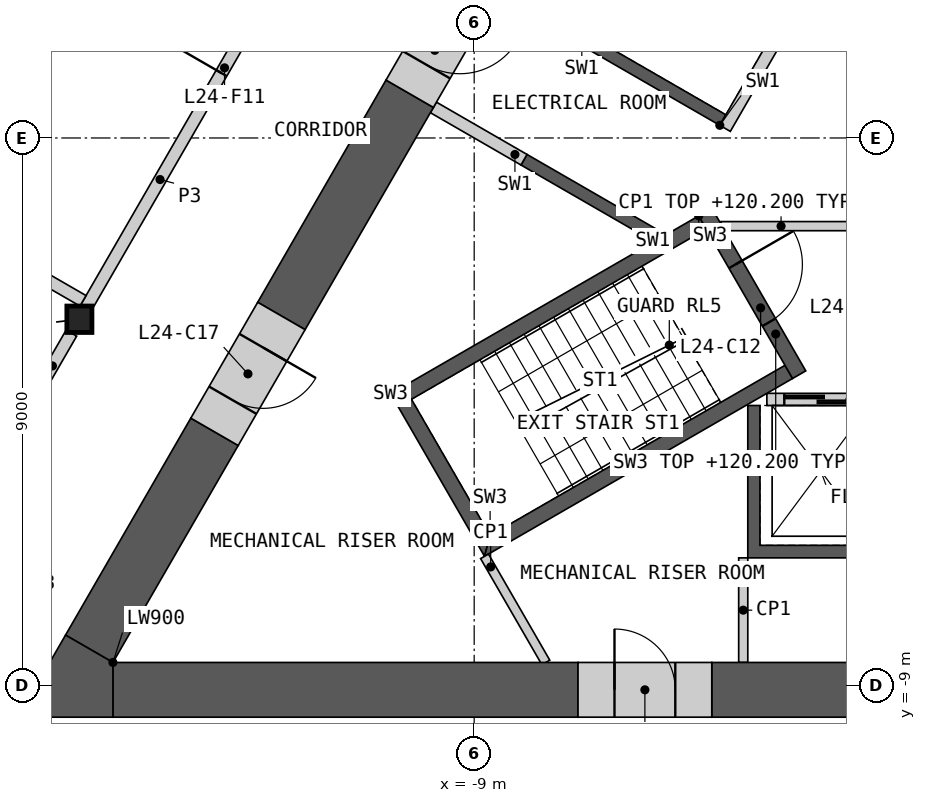
"""IFC4 building model, lengths in metres.
Left out: names, types, materials, properties, quantities, classifications, styles, units other than length and angle.
Written with IfcOpenShell. Run it as: python <this file> out.ifc"""

import sys

from ifc_helpers import new_model, si_unit, direction, frame, frame_2d, origin, origin_2d, place, context, subcontext, project, spatial, polyline, rectangle, i_section, outline, extrude, element, fill, save


model = new_model("IFC4")
c1 = context("Model", 3, precision=1e-05, world=origin(), true_north=direction((0.0, 1.0)))
c2 = subcontext(c1, "Body", "Model", "MODEL_VIEW")
j1 = project(units=[si_unit("LENGTHUNIT", "METRE"), si_unit("PLANEANGLEUNIT", "RADIAN")], contexts=[c1])
p1 = place(None, origin())
s1 = spatial("IfcSite", under=j1, at=p1, CompositionType="ELEMENT")
p2 = place(p1, origin())
s2 = spatial("IfcBuilding", under=s1, at=p2, CompositionType="ELEMENT")
p3 = place(p2, frame((0.0, 0.0, 116.4)))
s3 = spatial("IfcBuildingStorey", under=s2, at=p3, CompositionType="ELEMENT", Elevation=116.4)
p4 = place(p3, frame((-15.493, -2.982, 0.0), z_axis=(0.0, 0.0, 1.0), x_axis=(1.0, 0.0, 0.0)))
e1 = element("IfcColumn", 1, at=p4, inside=s3, PredefinedType="COLUMN", context=c2, shape_type="SweptSolid", body=[
    extrude(i_section(OverallWidth=0.412, OverallDepth=0.435, WebThickness=0.036, FlangeThickness=0.057, at=origin_2d()), origin(), (0.0, 0.0, 1.0), 4.2),
])
p5 = place(p3, origin())
e2 = element("IfcWall", 2, at=p5, inside=s3, PredefinedType="SHEAR", context=c2, shape_type="SweptSolid", body=[
    extrude(outline(polyline([(4.5, -4.4), (4.5, -6.906), (-4.5, -6.906), (-4.5, -4.4), (-4.3, -4.4), (-4.3, -6.7), (-2.3, -6.7), (-2.3, -4.4), (-2.1, -4.4), (-2.1, -6.7), (-0.1, -6.7), (-0.1, -4.4), (0.1, -4.4), (0.1, -6.7), (2.1, -6.7), (2.1, -4.4), (2.3, -4.4), (2.3, -6.7), (4.3, -6.7), (4.3, -4.4), (4.5, -4.4)])), origin(), (0.0, 0.0, 1.0), 3.8),
])
p6 = place(p3, frame((-4.187, -4.3, 0.0), z_axis=(0.0, 0.0, 1.0), x_axis=(1.0, 0.0, 0.0)))
e3 = element("IfcWall", 3, at=p6, inside=s3, PredefinedType="SOLIDWALL", context=c2, shape_type="SweptSolid", body=[
    extrude(rectangle(XDim=8.373, YDim=0.2, at=frame_2d((4.187, 0.0))), origin(), (0.0, 0.0, 1.0), 3.8),
])
p7 = place(p6, frame((0.287, 0.0, 0.0)))
e4 = element("IfcOpeningElement", 4, at=p7, cuts=e3, PredefinedType="OPENING", context=c2, shape_type="SweptSolid", body=[
    extrude(rectangle(XDim=1.2, YDim=2.1, at=frame_2d((0.6, 1.05))), frame((0.0, 0.11, 0.0), z_axis=(0.0, -1.0, 0.0), x_axis=(1.0, 0.0, 0.0)), (0.0, 0.0, 1.0), 0.22),
])
p8 = place(p6, frame((2.387, 0.0, 0.0)))
e5 = element("IfcOpeningElement", 5, at=p8, cuts=e3, PredefinedType="OPENING", context=c2, shape_type="SweptSolid", body=[
    extrude(rectangle(XDim=1.4, YDim=2.1, at=frame_2d((0.7, 1.05))), frame((0.0, 0.11, 0.0), z_axis=(0.0, -1.0, 0.0), x_axis=(1.0, 0.0, 0.0)), (0.0, 0.0, 1.0), 0.22),
])
p9 = place(p6, frame((4.737, 0.0, 0.0)))
e6 = element("IfcOpeningElement", 6, at=p9, cuts=e3, PredefinedType="OPENING", context=c2, shape_type="SweptSolid", body=[
    extrude(rectangle(XDim=1.1, YDim=2.1, at=frame_2d((0.55, 1.05))), frame((0.0, 0.11, 0.0), z_axis=(0.0, -1.0, 0.0), x_axis=(1.0, 0.0, 0.0)), (0.0, 0.0, 1.0), 0.22),
])
p10 = place(p6, frame((6.887, 0.0, 0.0)))
e7 = element("IfcOpeningElement", 7, at=p10, cuts=e3, PredefinedType="OPENING", context=c2, shape_type="SweptSolid", body=[
    extrude(rectangle(XDim=1.2, YDim=2.1, at=frame_2d((0.6, 1.05))), frame((0.0, 0.11, 0.0), z_axis=(0.0, -1.0, 0.0), x_axis=(1.0, 0.0, 0.0)), (0.0, 0.0, 1.0), 0.22),
])
p11 = place(p3, origin())
e8 = element("IfcWall", 8, at=p11, inside=s3, PredefinedType="SHEAR", context=c2, shape_type="SweptSolid", body=[
    extrude(outline(polyline([(-6.061, -1.697), (-8.231, -0.444), (-8.131, -0.271), (-5.96, -1.524), (-6.061, -1.697)])), origin(), (0.0, 0.0, 1.0), 3.8),
])
p12 = place(p3, origin())
e9 = element("IfcWall", 9, at=p12, inside=s3, PredefinedType="SHEAR", context=c2, shape_type="SweptSolid", body=[
    extrude(outline(polyline([(-4.96, 0.208), (-7.131, 1.461), (-5.931, 3.54), (-3.76, 2.287), (-3.861, 2.113), (-5.852, 3.263), (-6.852, 1.531), (-4.861, 0.381), (-4.96, 0.208)])), origin(), (0.0, 0.0, 1.0), 3.8),
])
p13 = place(p3, frame((-1.631, 5.776, 0.0), z_axis=(0.0, 0.0, 1.0), x_axis=(-0.499992876559, -0.866029516466, 0.0)))
e10 = element("IfcWall", 10, at=p13, inside=s3, PredefinedType="SOLIDWALL", context=c2, shape_type="SweptSolid", body=[
    extrude(rectangle(XDim=6.486, YDim=0.2, at=frame_2d((3.243, 0.0))), origin(), (0.0, 0.0, 1.0), 3.8),
])
p14 = place(p13, frame((0.437, 0.0, 0.0)))
e11 = element("IfcOpeningElement", 11, at=p14, cuts=e10, PredefinedType="OPENING", context=c2, shape_type="SweptSolid", body=[
    extrude(rectangle(XDim=0.9, YDim=2.1, at=frame_2d((0.45, 1.05))), frame((0.0, 0.11, 0.0), z_axis=(0.0, -1.0, 0.0), x_axis=(1.0, 0.0, 0.0)), (0.0, 0.0, 1.0), 0.22),
])
p15 = place(p13, frame((2.637, 0.0, 0.0)))
e12 = element("IfcOpeningElement", 12, at=p15, cuts=e10, PredefinedType="OPENING", context=c2, shape_type="SweptSolid", body=[
    extrude(rectangle(XDim=0.9, YDim=2.1, at=frame_2d((0.45, 1.05))), frame((0.0, 0.11, 0.0), z_axis=(0.0, -1.0, 0.0), x_axis=(1.0, 0.0, 0.0)), (0.0, 0.0, 1.0), 0.22),
])
p16 = place(p3, frame((-8.181, -0.357, 0.0), z_axis=(0.0, 0.0, 1.0), x_axis=(-0.866024871741, 0.500000921525, 0.0)))
e13 = element("IfcWall", 13, at=p16, inside=s3, PredefinedType="SHEAR", context=c2, shape_type="SweptSolid", body=[
    extrude(rectangle(XDim=1.72, YDim=0.2, at=frame_2d((0.86, 0.0))), origin(), (0.0, 0.0, 1.0), 3.8),
])
p17 = place(p3, frame((-4.941, -1.45, 0.0), z_axis=(0.0, 0.0, 1.0), x_axis=(1.0, 0.0, 0.0)))
e14 = element("IfcWall", 14, at=p17, inside=s3, PredefinedType="PARTITIONING", context=c2, shape_type="SweptSolid", body=[
    extrude(rectangle(XDim=9.882, YDim=0.15, at=frame_2d((4.941, 0.0))), origin(), (0.0, 0.0, 1.0), 3.8),
])
p18 = place(p17, frame((4.391, 0.0, 0.0)))
e15 = element("IfcOpeningElement", 15, at=p18, cuts=e14, PredefinedType="OPENING", context=c2, shape_type="SweptSolid", body=[
    extrude(rectangle(XDim=1.1, YDim=2.1, at=frame_2d((0.55, 1.05))), frame((0.0, 0.085, 0.0), z_axis=(0.0, -1.0, 0.0), x_axis=(1.0, 0.0, 0.0)), (0.0, 0.0, 1.0), 0.17),
])
p19 = place(p3, origin())
e16 = element("IfcWall", 16, at=p19, inside=s3, PredefinedType="SHEAR", context=c2, shape_type="SweptSolid", body=[
    extrude(outline(polyline([(-5.307, -1.281), (-10.374, -4.206), (-10.032, -4.298), (-5.182, -1.498), (-5.307, -1.281)])), origin(), (0.0, 0.0, 1.0), 3.8),
])
p20 = place(p3, origin())
e17 = element("IfcWall", 17, at=p20, inside=s3, PredefinedType="SHEAR", context=c2, shape_type="SweptSolid", body=[
    extrude(outline(polyline([(-10.374, -4.206), (-8.83, -6.881), (-8.738, -6.539), (-10.032, -4.298), (-10.374, -4.206)])), origin(), (0.0, 0.0, 1.0), 3.8),
])
p21 = place(p3, origin())
e18 = element("IfcWall", 18, at=p21, inside=s3, PredefinedType="SHEAR", context=c2, shape_type="SweptSolid", body=[
    extrude(outline(polyline([(-8.738, -6.539), (-8.83, -6.881), (-3.763, -3.956), (-3.888, -3.739), (-8.738, -6.539)])), origin(), (0.0, 0.0, 1.0), 3.8),
])
p22 = place(p3, frame((-5.199, -1.219, 0.0), z_axis=(0.0, 0.0, 1.0), x_axis=(0.499982516597, -0.866035497597, 0.0)))
e19 = element("IfcWall", 19, at=p22, inside=s3, PredefinedType="SHEAR", context=c2, shape_type="SweptSolid", body=[
    extrude(rectangle(XDim=3.088, YDim=0.25, at=frame_2d((1.544, 0.0))), origin(), (0.0, 0.0, 1.0), 3.8),
])
p23 = place(p22, frame((0.994, 0.0, 0.0)))
e20 = element("IfcOpeningElement", 20, at=p23, cuts=e19, PredefinedType="OPENING", context=c2, shape_type="SweptSolid", body=[
    extrude(rectangle(XDim=1.1, YDim=2.1, at=frame_2d((0.55, 1.05))), frame((0.0, 0.135, 0.0), z_axis=(0.0, -1.0, 0.0), x_axis=(1.0, 0.0, 0.0)), (0.0, 0.0, 1.0), 0.27),
])
p24 = place(p3, frame((-4.575, -6.906, 0.0), z_axis=(0.0, 0.0, 1.0), x_axis=(0.0, -1.0, 0.0)))
e21 = element("IfcWall", 21, at=p24, inside=s3, PredefinedType="PARTITIONING", context=c2, shape_type="SweptSolid", body=[
    extrude(rectangle(XDim=1.72, YDim=0.15, at=frame_2d((0.86, 0.0))), origin(), (0.0, 0.0, 1.0), 3.8),
])
p25 = place(p3, frame((-8.83, -6.881, 0.0), z_axis=(0.0, 0.0, 1.0), x_axis=(0.500085890408, -0.865975809255, 0.0)))
e22 = element("IfcWall", 22, at=p25, inside=s3, PredefinedType="PARTITIONING", context=c2, shape_type="SweptSolid", body=[
    extrude(rectangle(XDim=2.016, YDim=0.15, at=frame_2d((1.008, 0.0))), origin(), (0.0, 0.0, 1.0), 3.8),
])
p26 = place(p3, frame((-14.941, -9.076, 0.0), z_axis=(0.0, 0.0, 1.0), x_axis=(1.0, 0.0, 0.0)))
e23 = element("IfcWall", 23, at=p26, inside=s3, PredefinedType="SHEAR", context=c2, shape_type="SweptSolid", body=[
    extrude(rectangle(XDim=7.649, YDim=0.9, at=frame_2d((3.824, 0.0))), origin(), (0.0, 0.0, 1.0), 3.8),
])
p27 = place(p3, frame((-5.093, -9.076, 0.0), z_axis=(0.0, 0.0, 1.0), x_axis=(1.0, 0.0, 0.0)))
e24 = element("IfcWall", 24, at=p27, inside=s3, PredefinedType="SHEAR", context=c2, shape_type="SweptSolid", body=[
    extrude(rectangle(XDim=3.992, YDim=0.9, at=frame_2d((1.996, 0.0))), origin(), (0.0, 0.0, 1.0), 3.8),
])
p28 = place(p3, frame((-10.06, 0.728, 0.0), z_axis=(0.0, 0.0, 1.0), x_axis=(-0.500021220092, -0.866013152012, 0.0)))
e25 = element("IfcWall", 25, at=p28, inside=s3, PredefinedType="SHEAR", context=c2, shape_type="SweptSolid", body=[
    extrude(rectangle(XDim=4.22, YDim=0.9, at=frame_2d((2.11, 0.0))), origin(), (0.0, 0.0, 1.0), 3.8),
])
p29 = place(p3, frame((-13.271, -4.833, 0.0), z_axis=(0.0, 0.0, 1.0), x_axis=(-0.499994272862, -0.866028710324, 0.0)))
e26 = element("IfcWall", 26, at=p29, inside=s3, PredefinedType="SHEAR", context=c2, shape_type="SweptSolid", body=[
    extrude(rectangle(XDim=4.121, YDim=0.9, at=frame_2d((2.06, 0.0))), origin(), (0.0, 0.0, 1.0), 3.8),
])
p30 = place(p3, origin())
e27 = element("IfcWall", 27, at=p30, inside=s3, PredefinedType="SHEAR", context=c2, shape_type="SweptSolid", body=[
    extrude(outline(polyline([(-14.941, -8.626), (-14.941, -9.526), (-16.5, -9.526), (-15.721, -8.176), (-14.941, -8.626)])), origin(), (0.0, 0.0, 1.0), 3.8),
])
p31 = place(p3, frame((-12.171, -2.927, 0.0), z_axis=(0.0, 0.0, 1.0), x_axis=(-0.499946605688, -0.86605622881, 0.0)))
e28 = element("IfcWall", 28, at=p31, inside=s3, PredefinedType="SHEAR", context=c2, shape_type="SweptSolid", body=[
    extrude(rectangle(XDim=2.2, YDim=0.9, at=frame_2d((1.1, 0.0))), origin(), (0.0, 0.0, 1.0), 3.8),
])
p32 = place(p31, frame((0.6, 0.0, 0.0)))
e29 = element("IfcOpeningElement", 29, at=p32, cuts=e28, PredefinedType="OPENING", context=c2, shape_type="SweptSolid", body=[
    extrude(rectangle(XDim=1.0, YDim=2.1, at=frame_2d((0.5, 1.05))), frame((0.0, 0.46, 0.0), z_axis=(0.0, -1.0, 0.0), x_axis=(1.0, 0.0, 0.0)), (0.0, 0.0, 1.0), 0.92),
])
p33 = place(p3, frame((-7.292, -9.076, 0.0), z_axis=(0.0, 0.0, 1.0), x_axis=(1.0, 0.0, 0.0)))
e30 = element("IfcWall", 30, at=p33, inside=s3, PredefinedType="SHEAR", context=c2, shape_type="SweptSolid", body=[
    extrude(rectangle(XDim=2.2, YDim=0.9, at=frame_2d((1.1, 0.0))), origin(), (0.0, 0.0, 1.0), 3.8),
])
p34 = place(p33, frame((0.6, 0.0, 0.0)))
e31 = element("IfcOpeningElement", 31, at=p34, cuts=e30, PredefinedType="OPENING", context=c2, shape_type="SweptSolid", body=[
    extrude(rectangle(XDim=1.0, YDim=2.1, at=frame_2d((0.5, 1.05))), frame((0.0, 0.46, 0.0), z_axis=(0.0, -1.0, 0.0), x_axis=(1.0, 0.0, 0.0)), (0.0, 0.0, 1.0), 0.92),
])
p35 = place(p3, frame((-8.96, 2.633, 0.0), z_axis=(0.0, 0.0, 1.0), x_axis=(-0.50002983664, -0.866008176907, 0.0)))
e32 = element("IfcWall", 32, at=p35, inside=s3, PredefinedType="SHEAR", context=c2, shape_type="SweptSolid", body=[
    extrude(rectangle(XDim=2.2, YDim=0.9, at=frame_2d((1.1, 0.0))), origin(), (0.0, 0.0, 1.0), 3.8),
])
p36 = place(p35, frame((0.55, 0.0, 0.0)))
e33 = element("IfcOpeningElement", 33, at=p36, cuts=e32, PredefinedType="OPENING", context=c2, shape_type="SweptSolid", body=[
    extrude(rectangle(XDim=1.1, YDim=2.1, at=frame_2d((0.55, 1.05))), frame((0.0, 0.46, 0.0), z_axis=(0.0, -1.0, 0.0), x_axis=(1.0, 0.0, 0.0)), (0.0, 0.0, 1.0), 0.92),
])
p37 = place(p3, frame((-15.402, -2.823, 0.0), z_axis=(0.0, 0.0, 1.0), x_axis=(0.500023237168, 0.866011987384, 0.0)))
e34 = element("IfcWall", 34, at=p37, inside=s3, PredefinedType="PARTITIONING", context=c2, shape_type="SweptSolid", body=[
    extrude(rectangle(XDim=9.883, YDim=0.2, at=frame_2d((4.942, 0.0))), origin(), (0.0, 0.0, 1.0), 3.8),
])
p38 = place(p37, frame((4.492, 0.0, 0.0)))
e35 = element("IfcOpeningElement", 35, at=p38, cuts=e34, PredefinedType="OPENING", context=c2, shape_type="SweptSolid", body=[
    extrude(rectangle(XDim=1.0, YDim=2.1, at=frame_2d((0.5, 1.05))), frame((0.0, 0.11, 0.0), z_axis=(0.0, -1.0, 0.0), x_axis=(1.0, 0.0, 0.0)), (0.0, 0.0, 1.0), 0.22),
])
p39 = place(p3, frame((-18.744, -8.613, 0.0), z_axis=(0.0, 0.0, 1.0), x_axis=(0.499997920671, 0.866026604282, 0.0)))
e36 = element("IfcWall", 36, at=p39, inside=s3, PredefinedType="PARTITIONING", context=c2, shape_type="SweptSolid", body=[
    extrude(rectangle(XDim=6.24, YDim=0.2, at=frame_2d((3.12, 0.0))), origin(), (0.0, 0.0, 1.0), 3.8),
])
p40 = place(p39, frame((2.67, 0.0, 0.0)))
e37 = element("IfcOpeningElement", 37, at=p40, cuts=e36, PredefinedType="OPENING", context=c2, shape_type="SweptSolid", body=[
    extrude(rectangle(XDim=1.0, YDim=2.1, at=frame_2d((0.5, 1.05))), frame((0.0, 0.11, 0.0), z_axis=(0.0, -1.0, 0.0), x_axis=(1.0, 0.0, 0.0)), (0.0, 0.0, 1.0), 0.22),
])
p41 = place(p3, frame((-26.636, 3.79, 0.0), z_axis=(0.0, 0.0, 1.0), x_axis=(0.866029074283, -0.499993642455, 0.0)))
e38 = element("IfcWall", 38, at=p41, inside=s3, PredefinedType="PARTITIONING", context=c2, shape_type="SweptSolid", body=[
    extrude(rectangle(XDim=12.936, YDim=0.2, at=frame_2d((6.468, 0.0))), origin(), (0.0, 0.0, 1.0), 2.885),
])
p42 = place(p7, origin())
e39 = element("IfcDoor", 39, at=p42, inside=s3, OperationType="SLIDING_TO_LEFT", PredefinedType="DOOR", context=c2, shape_type="SweptSolid", body=[
    extrude(rectangle(XDim=1.2, YDim=2.1, at=frame_2d((0.6, 1.05))), frame((0.0, 0.025, 0.0), z_axis=(0.0, -1.0, 0.0), x_axis=(1.0, 0.0, 0.0)), (0.0, 0.0, 1.0), 0.05),
])
fill(e4, e39)
p43 = place(p23, origin())
e40 = element("IfcDoor", 40, at=p43, inside=s3, OperationType="SINGLE_SWING_LEFT", PredefinedType="DOOR", context=c2, shape_type="SweptSolid", body=[
    extrude(rectangle(XDim=1.1, YDim=2.1, at=frame_2d((0.55, 1.05))), frame((0.0, 0.025, 0.0), z_axis=(0.0, -1.0, 0.0), x_axis=(1.0, 0.0, 0.0)), (0.0, 0.0, 1.0), 0.05),
])
fill(e20, e40)
p44 = place(p32, origin())
e41 = element("IfcDoor", 41, at=p44, inside=s3, OperationType="SINGLE_SWING_LEFT", PredefinedType="DOOR", context=c2, shape_type="SweptSolid", body=[
    extrude(rectangle(XDim=1.0, YDim=2.1, at=frame_2d((0.5, 1.05))), frame((0.0, 0.205, 0.0), z_axis=(0.0, -1.0, 0.0), x_axis=(1.0, 0.0, 0.0)), (0.0, 0.0, 1.0), 0.05),
])
fill(e29, e41)
p45 = place(p34, origin())
e42 = element("IfcDoor", 42, at=p45, inside=s3, OperationType="SINGLE_SWING_LEFT", PredefinedType="DOOR", context=c2, shape_type="SweptSolid", body=[
    extrude(rectangle(XDim=1.0, YDim=2.1, at=frame_2d((0.5, 1.05))), frame((0.0, 0.205, 0.0), z_axis=(0.0, -1.0, 0.0), x_axis=(1.0, 0.0, 0.0)), (0.0, 0.0, 1.0), 0.05),
])
fill(e31, e42)
p46 = place(p36, origin())
e43 = element("IfcDoor", 43, at=p46, inside=s3, OperationType="SINGLE_SWING_LEFT", PredefinedType="DOOR", context=c2, shape_type="SweptSolid", body=[
    extrude(rectangle(XDim=1.1, YDim=2.1, at=frame_2d((0.55, 1.05))), frame((0.0, 0.205, 0.0), z_axis=(0.0, -1.0, 0.0), x_axis=(1.0, 0.0, 0.0)), (0.0, 0.0, 1.0), 0.05),
])
fill(e33, e43)
p47 = place(p38, origin())
e44 = element("IfcDoor", 44, at=p47, inside=s3, OperationType="SINGLE_SWING_LEFT", PredefinedType="DOOR", context=c2, shape_type="SweptSolid", body=[
    extrude(rectangle(XDim=1.0, YDim=2.1, at=frame_2d((0.5, 1.05))), frame((0.0, 0.025, 0.0), z_axis=(0.0, -1.0, 0.0), x_axis=(1.0, 0.0, 0.0)), (0.0, 0.0, 1.0), 0.05),
])
fill(e35, e44)
save(model, sys.argv[1])
